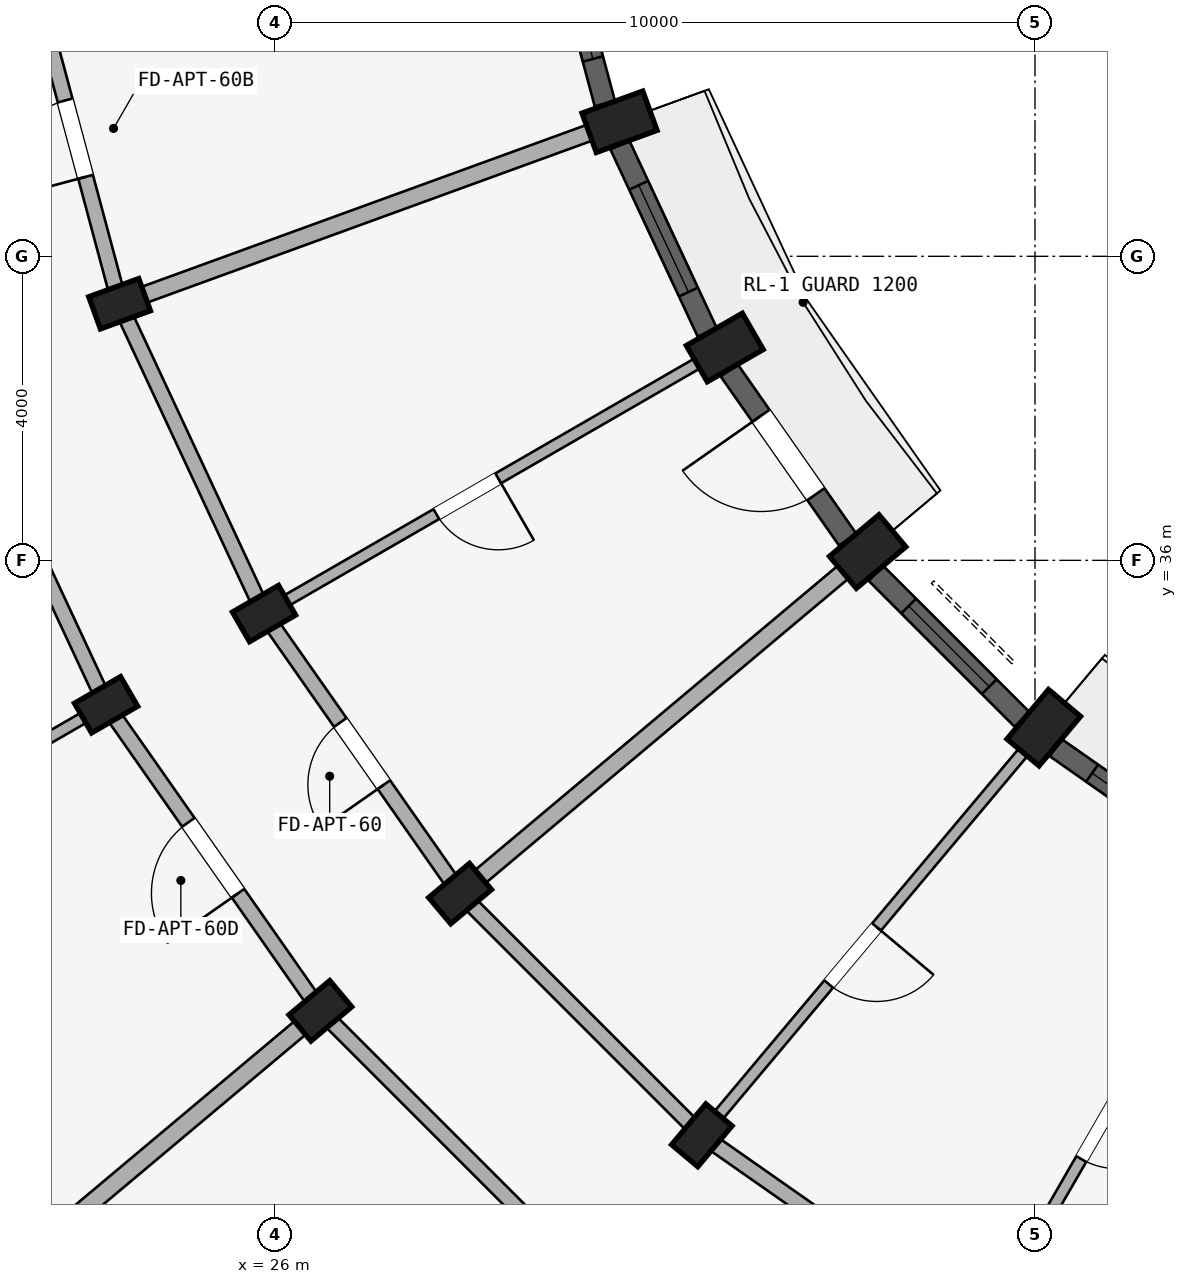
"""IFC4 building model, lengths in metres.
Left out: names, types, materials, properties, quantities, classifications, styles, units other than length and angle.
Written with IfcOpenShell. Run it as: python <this file> out.ifc"""

import sys

from ifc_helpers import new_model, si_unit, direction, frame, frame_2d, origin, origin_2d, place, context, subcontext, project, spatial, rectangle, extrude, element, fill, save


model = new_model("IFC4")
c1 = context("Model", 3, precision=1e-05, world=origin(), true_north=direction((0.0, 1.0)))
c2 = subcontext(c1, "Body", "Model", "MODEL_VIEW")
j1 = project(units=[si_unit("LENGTHUNIT", "METRE"), si_unit("PLANEANGLEUNIT", "RADIAN")], contexts=[c1])
p1 = place(None, origin())
s1 = spatial("IfcSite", under=j1, at=p1, CompositionType="ELEMENT")
p2 = place(p1, origin())
s2 = spatial("IfcBuilding", under=s1, at=p2, CompositionType="ELEMENT")
p3 = place(p2, frame((0.0, 0.0, 11.85)))
s3 = spatial("IfcBuildingStorey", under=s2, at=p3, CompositionType="ELEMENT", Elevation=11.85)
p4 = place(p3, frame((36.115, 33.798, 0.0), z_axis=(0.0, 0.0, 1.0), x_axis=(-0.766044443119, 0.642787609687, 0.0)))
e1 = element("IfcColumn", 1, at=p4, inside=s3, PredefinedType="COLUMN", context=c2, shape_type="SweptSolid", body=[
    extrude(rectangle(XDim=0.55, YDim=0.85, at=origin_2d()), origin(), (0.0, 0.0, 1.0), 2.93),
])
p5 = place(p3, frame((31.616, 28.436, 0.0), z_axis=(0.0, 0.0, 1.0), x_axis=(-0.766044443119, 0.642787609687, 0.0)))
e2 = element("IfcColumn", 2, at=p5, inside=s3, PredefinedType="COLUMN", context=c2, shape_type="SweptSolid", body=[
    extrude(rectangle(XDim=0.45, YDim=0.7, at=origin_2d()), origin(), (0.0, 0.0, 1.0), 2.93),
])
p6 = place(p3, frame((33.798, 36.115, 0.0), z_axis=(0.0, 0.0, 1.0), x_axis=(-0.642787609687, 0.766044443119, 0.0)))
e3 = element("IfcColumn", 3, at=p6, inside=s3, PredefinedType="COLUMN", context=c2, shape_type="SweptSolid", body=[
    extrude(rectangle(XDim=0.55, YDim=0.85, at=origin_2d()), origin(), (0.0, 0.0, 1.0), 2.93),
])
for number, where, z_axis, x_axis in (
    (4, (28.436, 31.616, 0.0), (0.0, 0.0, 1.0), (-0.643, 0.766, 0.0)),
    (5, (26.598, 30.073, 0.0), (0.0, 0.0, 1.0), (-0.643, 0.766, 0.0)),
):
    element("IfcColumn", number, at=place(p3, frame(where, z_axis=z_axis, x_axis=x_axis)), inside=s3, PredefinedType="COLUMN", context=c2, shape_type="SweptSolid", body=[
        extrude(rectangle(XDim=0.45, YDim=0.7, at=origin_2d()), origin(), (0.0, 0.0, 1.0), 2.93),
    ])
p7 = place(p3, frame((31.919, 38.8, 0.0), z_axis=(0.0, 0.0, 1.0), x_axis=(-0.5, 0.866025403784, 0.0)))
e6 = element("IfcColumn", 6, at=p7, inside=s3, PredefinedType="COLUMN", context=c2, shape_type="SweptSolid", body=[
    extrude(rectangle(XDim=0.55, YDim=0.85, at=origin_2d()), origin(), (0.0, 0.0, 1.0), 2.93),
])
for number, where, z_axis, x_axis in (
    (7, (25.856, 35.3, 0.0), (0.0, 0.0, 1.0), (-0.5, 0.866, 0.0)),
    (8, (23.778, 34.1, 0.0), (0.0, 0.0, 1.0), (-0.5, 0.866, 0.0)),
):
    element("IfcColumn", number, at=place(p3, frame(where, z_axis=z_axis, x_axis=x_axis)), inside=s3, PredefinedType="COLUMN", context=c2, shape_type="SweptSolid", body=[
        extrude(rectangle(XDim=0.45, YDim=0.7, at=origin_2d()), origin(), (0.0, 0.0, 1.0), 2.93),
    ])
p8 = place(p3, frame((30.534, 41.77, 0.0), z_axis=(0.0, 0.0, 1.0), x_axis=(-0.342020143326, 0.939692620786, 0.0)))
e9 = element("IfcColumn", 9, at=p8, inside=s3, PredefinedType="COLUMN", context=c2, shape_type="SweptSolid", body=[
    extrude(rectangle(XDim=0.55, YDim=0.85, at=origin_2d()), origin(), (0.0, 0.0, 1.0), 2.93),
])
p9 = place(p3, frame((23.956, 39.376, 0.0), z_axis=(0.0, 0.0, 1.0), x_axis=(-0.342020143326, 0.939692620786, 0.0)))
e10 = element("IfcColumn", 10, at=p9, inside=s3, PredefinedType="COLUMN", context=c2, shape_type="SweptSolid", body=[
    extrude(rectangle(XDim=0.45, YDim=0.7, at=origin_2d()), origin(), (0.0, 0.0, 1.0), 2.93),
])
p10 = place(p3, frame((35.3, 25.856, 0.0), z_axis=(0.0, 0.0, 1.0), x_axis=(-0.819155404658, 0.573571637217, 0.0)))
e11 = element("IfcWall", 11, at=p10, inside=s3, PredefinedType="STANDARD", context=c2, shape_type="SweptSolid", body=[
    extrude(rectangle(XDim=4.497, YDim=0.2, at=frame_2d((2.249, 0.0))), origin(), (0.0, 0.0, 1.0), 2.372),
])
p11 = place(p3, frame((31.616, 28.436, 0.0), z_axis=(0.0, 0.0, 1.0), x_axis=(-0.707106781187, 0.707106781187, 0.0)))
e12 = element("IfcWall", 12, at=p11, inside=s3, PredefinedType="STANDARD", context=c2, shape_type="SweptSolid", body=[
    extrude(rectangle(XDim=4.497, YDim=0.2, at=frame_2d((2.249, 0.0))), origin(), (0.0, 0.0, 1.0), 2.372),
])
p12 = place(p3, frame((30.073, 26.598, 0.0), z_axis=(0.0, 0.0, 1.0), x_axis=(-0.707106781187, 0.707106781187, 0.0)))
e13 = element("IfcWall", 13, at=p12, inside=s3, PredefinedType="STANDARD", context=c2, shape_type="SweptSolid", body=[
    extrude(rectangle(XDim=4.916, YDim=0.2, at=frame_2d((2.458, 0.0))), origin(), (0.0, 0.0, 1.0), 2.372),
])
p13 = place(p3, frame((28.436, 31.616, 0.0), z_axis=(0.0, 0.0, 1.0), x_axis=(-0.573571637217, 0.819155404658, 0.0)))
e14 = element("IfcWall", 14, at=p13, inside=s3, PredefinedType="STANDARD", context=c2, shape_type="SweptSolid", body=[
    extrude(rectangle(XDim=4.497, YDim=0.2, at=frame_2d((2.249, 0.0))), origin(), (0.0, 0.0, 1.0), 2.372),
])
p14 = place(p13, frame((1.749, 0.0, 0.0)))
e15 = element("IfcOpeningElement", 15, at=p14, cuts=e14, PredefinedType="OPENING", context=c2, shape_type="SweptSolid", body=[
    extrude(rectangle(XDim=1.0, YDim=2.15, at=frame_2d((0.5, 1.075))), frame((0.0, 0.11, 0.0), z_axis=(0.0, -1.0, 0.0), x_axis=(1.0, 0.0, 0.0)), (0.0, 0.0, 1.0), 0.22),
])
p15 = place(p3, frame((26.598, 30.073, 0.0), z_axis=(0.0, 0.0, 1.0), x_axis=(-0.573592335331, 0.819140911474, 0.0)))
e16 = element("IfcWall", 16, at=p15, inside=s3, PredefinedType="STANDARD", context=c2, shape_type="SweptSolid", body=[
    extrude(rectangle(XDim=4.916, YDim=0.2, at=frame_2d((2.458, 0.0))), origin(), (0.0, 0.0, 1.0), 2.372),
])
p16 = place(p15, frame((1.888, 0.0, 0.0)))
e17 = element("IfcOpeningElement", 17, at=p16, cuts=e16, PredefinedType="OPENING", context=c2, shape_type="SweptSolid", body=[
    extrude(rectangle(XDim=1.14, YDim=2.15, at=frame_2d((0.57, 1.075))), frame((0.0, 0.11, 0.0), z_axis=(0.0, -1.0, 0.0), x_axis=(1.0, 0.0, 0.0)), (0.0, 0.0, 1.0), 0.22),
])
p17 = place(p3, frame((25.856, 35.3, 0.0), z_axis=(0.0, 0.0, 1.0), x_axis=(-0.422617978463, 0.906307919131, 0.0)))
e18 = element("IfcWall", 18, at=p17, inside=s3, PredefinedType="STANDARD", context=c2, shape_type="SweptSolid", body=[
    extrude(rectangle(XDim=4.497, YDim=0.2, at=frame_2d((2.249, 0.0))), origin(), (0.0, 0.0, 1.0), 2.372),
])
p18 = place(p3, frame((23.778, 34.1, 0.0), z_axis=(0.0, 0.0, 1.0), x_axis=(-0.422629854778, 0.906302381024, 0.0)))
e19 = element("IfcWall", 19, at=p18, inside=s3, PredefinedType="STANDARD", context=c2, shape_type="SweptSolid", body=[
    extrude(rectangle(XDim=4.915, YDim=0.2, at=frame_2d((2.458, 0.0))), origin(), (0.0, 0.0, 1.0), 2.372),
])
p19 = place(p3, frame((23.956, 39.376, 0.0), z_axis=(0.0, 0.0, 1.0), x_axis=(-0.258787642463, 0.965934240054, 0.0)))
e20 = element("IfcWall", 20, at=p19, inside=s3, PredefinedType="STANDARD", context=c2, shape_type="SweptSolid", body=[
    extrude(rectangle(XDim=4.497, YDim=0.2, at=frame_2d((2.249, 0.0))), origin(), (0.0, 0.0, 1.0), 2.372),
])
p20 = place(p19, frame((1.729, 0.0, 0.0)))
e21 = element("IfcOpeningElement", 21, at=p20, cuts=e20, PredefinedType="OPENING", context=c2, shape_type="SweptSolid", body=[
    extrude(rectangle(XDim=1.04, YDim=2.15, at=frame_2d((0.52, 1.075))), frame((0.0, 0.11, 0.0), z_axis=(0.0, -1.0, 0.0), x_axis=(1.0, 0.0, 0.0)), (0.0, 0.0, 1.0), 0.22),
])
p21 = place(p3, frame((38.7, 31.746, 0.0), z_axis=(0.0, 0.0, 1.0), x_axis=(-0.499997969693, -0.866026575979, 0.0)))
e22 = element("IfcWall", 22, at=p21, inside=s3, PredefinedType="PARTITIONING", context=c2, shape_type="SweptSolid", body=[
    extrude(rectangle(XDim=6.75, YDim=0.15, at=frame_2d((3.375, 0.0))), origin(), (0.0, 0.0, 1.0), 2.372),
])
p22 = place(p21, frame((3.242, 0.0, 0.0)))
e23 = element("IfcOpeningElement", 23, at=p22, cuts=e22, PredefinedType="OPENING", context=c2, shape_type="SweptSolid", body=[
    extrude(rectangle(XDim=0.94, YDim=2.1, at=frame_2d((0.47, 1.05))), frame((0.0, 0.085, 0.0), z_axis=(0.0, -1.0, 0.0), x_axis=(1.0, 0.0, 0.0)), (0.0, 0.0, 1.0), 0.17),
])
p23 = place(p3, frame((35.987, 33.645, 0.0), z_axis=(0.0, 0.0, 1.0), x_axis=(-0.642784846501, -0.766046761698, 0.0)))
e24 = element("IfcWall", 24, at=p23, inside=s3, PredefinedType="PARTITIONING", context=c2, shape_type="SweptSolid", body=[
    extrude(rectangle(XDim=6.75, YDim=0.15, at=frame_2d((3.375, 0.0))), origin(), (0.0, 0.0, 1.0), 2.372),
])
p24 = place(p23, frame((3.222, 0.0, 0.0)))
e25 = element("IfcOpeningElement", 25, at=p24, cuts=e24, PredefinedType="OPENING", context=c2, shape_type="SweptSolid", body=[
    extrude(rectangle(XDim=0.98, YDim=2.12, at=frame_2d((0.49, 1.06))), frame((0.0, 0.085, 0.0), z_axis=(0.0, -1.0, 0.0), x_axis=(1.0, 0.0, 0.0)), (0.0, 0.0, 1.0), 0.17),
])
p25 = place(p3, frame((33.645, 35.987, 0.0), z_axis=(0.0, 0.0, 1.0), x_axis=(-0.766046761698, -0.642784846501, 0.0)))
e26 = element("IfcWall", 26, at=p25, inside=s3, PredefinedType="STANDARD", context=c2, shape_type="SweptSolid", body=[
    extrude(rectangle(XDim=6.75, YDim=0.22, at=frame_2d((3.375, 0.0))), origin(), (0.0, 0.0, 1.0), 2.372),
])
p26 = place(p3, frame((26.521, 30.009, 0.0), z_axis=(0.0, 0.0, 1.0), x_axis=(-0.766046835987, -0.642784757967, 0.0)))
e27 = element("IfcWall", 27, at=p26, inside=s3, PredefinedType="STANDARD", context=c2, shape_type="SweptSolid", body=[
    extrude(rectangle(XDim=17.42, YDim=0.23, at=frame_2d((8.71, 0.0))), origin(), (0.0, 0.0, 1.0), 2.372),
])
p27 = place(p3, frame((31.746, 38.7, 0.0), z_axis=(0.0, 0.0, 1.0), x_axis=(-0.866026575979, -0.499997969693, 0.0)))
e28 = element("IfcWall", 28, at=p27, inside=s3, PredefinedType="PARTITIONING", context=c2, shape_type="SweptSolid", body=[
    extrude(rectangle(XDim=6.75, YDim=0.15, at=frame_2d((3.375, 0.0))), origin(), (0.0, 0.0, 1.0), 2.372),
])
p28 = place(p27, frame((3.242, 0.0, 0.0)))
e29 = element("IfcOpeningElement", 29, at=p28, cuts=e28, PredefinedType="OPENING", context=c2, shape_type="SweptSolid", body=[
    extrude(rectangle(XDim=0.94, YDim=2.1, at=frame_2d((0.47, 1.05))), frame((0.0, 0.085, 0.0), z_axis=(0.0, -1.0, 0.0), x_axis=(1.0, 0.0, 0.0)), (0.0, 0.0, 1.0), 0.17),
])
p29 = place(p3, frame((23.691, 34.05, 0.0), z_axis=(0.0, 0.0, 1.0), x_axis=(-0.866026648973, -0.499997843263, 0.0)))
e30 = element("IfcWall", 30, at=p29, inside=s3, PredefinedType="PARTITIONING", context=c2, shape_type="SweptSolid", body=[
    extrude(rectangle(XDim=17.42, YDim=0.15, at=frame_2d((8.71, 0.0))), origin(), (0.0, 0.0, 1.0), 2.372),
])
p30 = place(p29, frame((4.45, 0.0, 0.0)))
e31 = element("IfcOpeningElement", 31, at=p30, cuts=e30, PredefinedType="OPENING", context=c2, shape_type="SweptSolid", body=[
    extrude(rectangle(XDim=0.8, YDim=2.1, at=frame_2d((0.4, 1.05))), frame((0.0, 0.085, 0.0), z_axis=(0.0, -1.0, 0.0), x_axis=(1.0, 0.0, 0.0)), (0.0, 0.0, 1.0), 0.17),
])
p31 = place(p3, frame((30.346, 41.702, 0.0), z_axis=(0.0, 0.0, 1.0), x_axis=(-0.939696231917, -0.342010221662, 0.0)))
e32 = element("IfcWall", 32, at=p31, inside=s3, PredefinedType="STANDARD", context=c2, shape_type="SweptSolid", body=[
    extrude(rectangle(XDim=6.75, YDim=0.22, at=frame_2d((3.375, 0.0))), origin(), (0.0, 0.0, 1.0), 2.372),
])
p32 = place(p3, frame((38.499, 31.977, 0.0), z_axis=(0.0, 0.0, 1.0), x_axis=(-0.81917282593, 0.573546755948, 0.0)))
e33 = element("IfcWall", 33, at=p32, inside=s3, PredefinedType="STANDARD", context=c2, shape_type="SweptSolid", body=[
    extrude(rectangle(XDim=2.718, YDim=0.275, at=frame_2d((1.359, 0.0))), origin(), (0.0, 0.0, 1.0), 2.422),
])
p33 = place(p32, frame((0.584, 0.0, 0.622)))
e34 = element("IfcOpeningElement", 34, at=p33, cuts=e33, PredefinedType="OPENING", context=c2, shape_type="SweptSolid", body=[
    extrude(rectangle(XDim=1.55, YDim=1.6, at=frame_2d((0.775, 0.8))), frame((0.0, 0.147, 0.0), z_axis=(0.0, -1.0, 0.0), x_axis=(1.0, 0.0, 0.0)), (0.0, 0.0, 1.0), 0.295),
])
p34 = place(p3, frame((35.829, 33.908, 0.0), z_axis=(0.0, 0.0, 1.0), x_axis=(-0.707106781187, 0.707106781187, 0.0)))
e35 = element("IfcWall", 35, at=p34, inside=s3, PredefinedType="STANDARD", context=c2, shape_type="SweptSolid", body=[
    extrude(rectangle(XDim=2.718, YDim=0.275, at=frame_2d((1.359, 0.0))), origin(), (0.0, 0.0, 1.0), 2.422),
])
p35 = place(p34, frame((0.609, 0.0, 0.572)))
e36 = element("IfcOpeningElement", 36, at=p35, cuts=e35, PredefinedType="OPENING", context=c2, shape_type="SweptSolid", body=[
    extrude(rectangle(XDim=1.5, YDim=1.65, at=frame_2d((0.75, 0.825))), frame((0.0, 0.147, 0.0), z_axis=(0.0, -1.0, 0.0), x_axis=(1.0, 0.0, 0.0)), (0.0, 0.0, 1.0), 0.295),
])
p36 = place(p3, frame((33.535, 36.273, 0.0), z_axis=(0.0, 0.0, 1.0), x_axis=(-0.573546755948, 0.81917282593, 0.0)))
e37 = element("IfcWall", 37, at=p36, inside=s3, PredefinedType="STANDARD", context=c2, shape_type="SweptSolid", body=[
    extrude(rectangle(XDim=2.718, YDim=0.275, at=frame_2d((1.359, 0.0))), origin(), (0.0, 0.0, 1.0), 2.422),
])
p37 = place(p36, frame((0.729, 0.0, 0.0)))
e38 = element("IfcOpeningElement", 38, at=p37, cuts=e37, PredefinedType="OPENING", context=c2, shape_type="SweptSolid", body=[
    extrude(rectangle(XDim=1.26, YDim=2.15, at=frame_2d((0.63, 1.075))), frame((0.0, 0.147, 0.0), z_axis=(0.0, -1.0, 0.0), x_axis=(1.0, 0.0, 0.0)), (0.0, 0.0, 1.0), 0.295),
])
p38 = place(p3, frame((31.687, 39.001, 0.0), z_axis=(0.0, 0.0, 1.0), x_axis=(-0.422610022166, 0.906311629168, 0.0)))
e39 = element("IfcWall", 39, at=p38, inside=s3, PredefinedType="STANDARD", context=c2, shape_type="SweptSolid", body=[
    extrude(rectangle(XDim=2.718, YDim=0.275, at=frame_2d((1.359, 0.0))), origin(), (0.0, 0.0, 1.0), 2.422),
])
p39 = place(p38, frame((0.584, 0.0, 0.622)))
e40 = element("IfcOpeningElement", 40, at=p39, cuts=e39, PredefinedType="OPENING", context=c2, shape_type="SweptSolid", body=[
    extrude(rectangle(XDim=1.55, YDim=1.6, at=frame_2d((0.775, 0.8))), frame((0.0, 0.147, 0.0), z_axis=(0.0, -1.0, 0.0), x_axis=(1.0, 0.0, 0.0)), (0.0, 0.0, 1.0), 0.295),
])
p40 = place(p3, frame((30.341, 42.008, 0.0), z_axis=(0.0, 0.0, 1.0), x_axis=(-0.258819907011, 0.965925595341, 0.0)))
e41 = element("IfcWall", 41, at=p40, inside=s3, PredefinedType="STANDARD", context=c2, shape_type="SweptSolid", body=[
    extrude(rectangle(XDim=2.718, YDim=0.275, at=frame_2d((1.359, 0.0))), origin(), (0.0, 0.0, 1.0), 2.422),
])
p41 = place(p40, frame((0.609, 0.0, 0.572)))
e42 = element("IfcOpeningElement", 42, at=p41, cuts=e41, PredefinedType="OPENING", context=c2, shape_type="SweptSolid", body=[
    extrude(rectangle(XDim=1.5, YDim=1.65, at=frame_2d((0.75, 0.825))), frame((0.0, 0.147, 0.0), z_axis=(0.0, -1.0, 0.0), x_axis=(1.0, 0.0, 0.0)), (0.0, 0.0, 1.0), 0.295),
])
p42 = place(p33, origin())
e43 = element("IfcWindow", 43, at=p42, inside=s3, PartitioningType="DOUBLE_PANEL_VERTICAL", PredefinedType="WINDOW", context=c2, shape_type="SweptSolid", body=[
    extrude(rectangle(XDim=1.55, YDim=1.6, at=frame_2d((0.775, 0.8))), frame((0.0, 0.03, 0.0), z_axis=(0.0, -1.0, 0.0), x_axis=(1.0, 0.0, 0.0)), (0.0, 0.0, 1.0), 0.06),
])
fill(e34, e43)
p43 = place(p35, origin())
e44 = element("IfcWindow", 44, at=p43, inside=s3, PartitioningType="DOUBLE_PANEL_VERTICAL", PredefinedType="WINDOW", context=c2, shape_type="SweptSolid", body=[
    extrude(rectangle(XDim=1.5, YDim=1.65, at=frame_2d((0.75, 0.825))), frame((0.0, 0.03, 0.0), z_axis=(0.0, -1.0, 0.0), x_axis=(1.0, 0.0, 0.0)), (0.0, 0.0, 1.0), 0.06),
])
fill(e36, e44)
p44 = place(p39, origin())
e45 = element("IfcWindow", 45, at=p44, inside=s3, PartitioningType="DOUBLE_PANEL_VERTICAL", PredefinedType="WINDOW", context=c2, shape_type="SweptSolid", body=[
    extrude(rectangle(XDim=1.55, YDim=1.6, at=frame_2d((0.775, 0.8))), frame((0.0, 0.03, 0.0), z_axis=(0.0, -1.0, 0.0), x_axis=(1.0, 0.0, 0.0)), (0.0, 0.0, 1.0), 0.06),
])
fill(e40, e45)
p45 = place(p41, origin())
e46 = element("IfcWindow", 46, at=p45, inside=s3, PartitioningType="DOUBLE_PANEL_VERTICAL", PredefinedType="WINDOW", context=c2, shape_type="SweptSolid", body=[
    extrude(rectangle(XDim=1.5, YDim=1.65, at=frame_2d((0.75, 0.825))), frame((0.0, 0.03, 0.0), z_axis=(0.0, -1.0, 0.0), x_axis=(1.0, 0.0, 0.0)), (0.0, 0.0, 1.0), 0.06),
])
fill(e42, e46)
p46 = place(p22, frame((0.94, 0.0, 0.0), z_axis=(0.0, 0.0, 1.0), x_axis=(-1.0, 0.0, 0.0)))
e47 = element("IfcDoor", 47, at=p46, inside=s3, OperationType="SINGLE_SWING_RIGHT", PredefinedType="DOOR", context=c2, shape_type="SweptSolid", body=[
    extrude(rectangle(XDim=0.94, YDim=2.1, at=frame_2d((0.47, 1.05))), frame((0.0, 0.025, 0.0), z_axis=(0.0, -1.0, 0.0), x_axis=(1.0, 0.0, 0.0)), (0.0, 0.0, 1.0), 0.05),
])
fill(e23, e47)
p47 = place(p24, origin())
e48 = element("IfcDoor", 48, at=p47, inside=s3, OperationType="SINGLE_SWING_LEFT", PredefinedType="DOOR", context=c2, shape_type="SweptSolid", body=[
    extrude(rectangle(XDim=0.98, YDim=2.12, at=frame_2d((0.49, 1.06))), frame((0.0, 0.025, 0.0), z_axis=(0.0, -1.0, 0.0), x_axis=(1.0, 0.0, 0.0)), (0.0, 0.0, 1.0), 0.05),
])
fill(e25, e48)
p48 = place(p28, origin())
e49 = element("IfcDoor", 49, at=p48, inside=s3, OperationType="SINGLE_SWING_LEFT", PredefinedType="DOOR", context=c2, shape_type="SweptSolid", body=[
    extrude(rectangle(XDim=0.94, YDim=2.1, at=frame_2d((0.47, 1.05))), frame((0.0, 0.025, 0.0), z_axis=(0.0, -1.0, 0.0), x_axis=(1.0, 0.0, 0.0)), (0.0, 0.0, 1.0), 0.05),
])
fill(e29, e49)
p49 = place(p16, frame((1.14, 0.0, 0.0), z_axis=(0.0, 0.0, 1.0), x_axis=(-1.0, 0.0, 0.0)))
e50 = element("IfcDoor", 50, at=p49, inside=s3, OperationType="SINGLE_SWING_RIGHT", PredefinedType="DOOR", context=c2, shape_type="SweptSolid", body=[
    extrude(rectangle(XDim=1.14, YDim=2.15, at=frame_2d((0.57, 1.075))), frame((0.0, 0.025, 0.0), z_axis=(0.0, -1.0, 0.0), x_axis=(1.0, 0.0, 0.0)), (0.0, 0.0, 1.0), 0.05),
])
fill(e17, e50)
p50 = place(p14, frame((1.0, 0.0, 0.0), z_axis=(0.0, 0.0, 1.0), x_axis=(-1.0, 0.0, 0.0)))
e51 = element("IfcDoor", 51, at=p50, inside=s3, OperationType="SINGLE_SWING_RIGHT", PredefinedType="DOOR", context=c2, shape_type="SweptSolid", body=[
    extrude(rectangle(XDim=1.0, YDim=2.15, at=frame_2d((0.5, 1.075))), frame((0.0, 0.025, 0.0), z_axis=(0.0, -1.0, 0.0), x_axis=(1.0, 0.0, 0.0)), (0.0, 0.0, 1.0), 0.05),
])
fill(e15, e51)
p51 = place(p20, origin())
e52 = element("IfcDoor", 52, at=p51, inside=s3, OperationType="SINGLE_SWING_LEFT", PredefinedType="DOOR", context=c2, shape_type="SweptSolid", body=[
    extrude(rectangle(XDim=1.04, YDim=2.15, at=frame_2d((0.52, 1.075))), frame((0.0, 0.025, 0.0), z_axis=(0.0, -1.0, 0.0), x_axis=(1.0, 0.0, 0.0)), (0.0, 0.0, 1.0), 0.05),
])
fill(e21, e52)
p52 = place(p37, frame((1.26, 0.0, 0.0), z_axis=(0.0, 0.0, 1.0), x_axis=(-1.0, 0.0, 0.0)))
e53 = element("IfcDoor", 53, at=p52, inside=s3, OperationType="SINGLE_SWING_LEFT", PredefinedType="DOOR", context=c2, shape_type="SweptSolid", body=[
    extrude(rectangle(XDim=1.26, YDim=2.15, at=frame_2d((0.63, 1.075))), frame((0.0, 0.025, 0.0), z_axis=(0.0, -1.0, 0.0), x_axis=(1.0, 0.0, 0.0)), (0.0, 0.0, 1.0), 0.05),
])
fill(e38, e53)
save(model, sys.argv[1])
